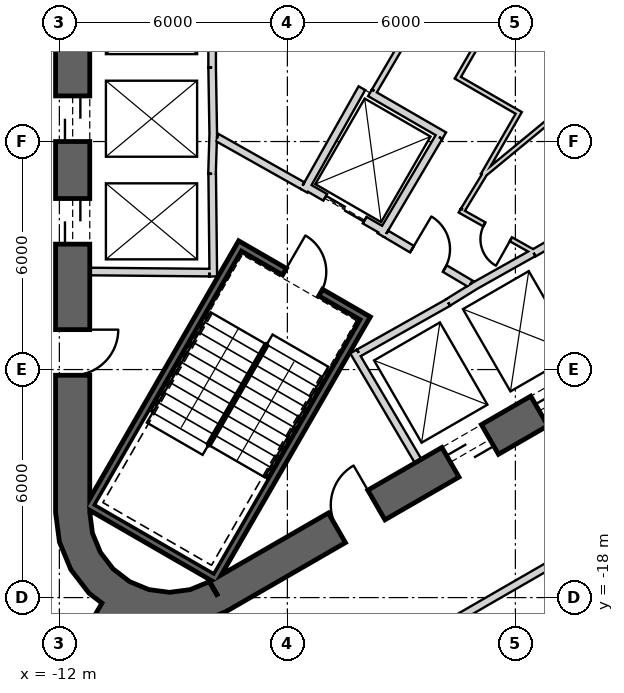
"""IFC4 building model, lengths in metres.
Left out: names, types, materials, properties, quantities, classifications, styles, units other than length and angle.
Written with IfcOpenShell. Run it as: python <this file> out.ifc"""

import sys

from ifc_helpers import new_model, si_unit, direction, frame, frame_2d, origin, place, context, subcontext, project, spatial, polyline, rectangle, outline, extrude, element, fill, save


model = new_model("IFC4")
c1 = context("Model", 3, precision=1e-05, world=origin(), true_north=direction((0.0, 1.0)))
c2 = subcontext(c1, "Body", "Model", "MODEL_VIEW")
j1 = project(units=[si_unit("LENGTHUNIT", "METRE"), si_unit("PLANEANGLEUNIT", "RADIAN")], contexts=[c1])
p1 = place(None, origin())
s1 = spatial("IfcSite", under=j1, at=p1, CompositionType="ELEMENT")
p2 = place(p1, origin())
s2 = spatial("IfcBuilding", under=s1, at=p2, CompositionType="ELEMENT")
p3 = place(p2, frame((0.0, 0.0, 229.2)))
s3 = spatial("IfcBuildingStorey", under=s2, at=p3, CompositionType="ELEMENT", Elevation=229.2)
p4 = place(p3, frame((-11.65, 15.762, 0.0), z_axis=(0.0, 0.0, 1.0), x_axis=(0.0, -1.0, 0.0)))
e1 = element("IfcWall", 1, at=p4, inside=s3, PredefinedType="SHEAR", context=c2, shape_type="SweptSolid", body=[
    extrude(rectangle(XDim=31.523, YDim=0.9, at=frame_2d((15.762, 0.0))), origin(), (0.0, 0.0, 1.0), 4.0),
])
p5 = place(p4, frame((7.062, 0.0, 0.0)))
e2 = element("IfcOpeningElement", 2, at=p5, cuts=e1, PredefinedType="OPENING", context=c2, shape_type="SweptSolid", body=[
    extrude(rectangle(XDim=1.2, YDim=2.4, at=frame_2d((0.6, 1.2))), frame((0.0, 0.46, 0.0), z_axis=(0.0, -1.0, 0.0), x_axis=(1.0, 0.0, 0.0)), (0.0, 0.0, 1.0), 0.92),
])
p6 = place(p4, frame((9.762, 0.0, 0.0)))
e3 = element("IfcOpeningElement", 3, at=p6, cuts=e1, PredefinedType="OPENING", context=c2, shape_type="SweptSolid", body=[
    extrude(rectangle(XDim=1.2, YDim=2.4, at=frame_2d((0.6, 1.2))), frame((0.0, 0.46, 0.0), z_axis=(0.0, -1.0, 0.0), x_axis=(1.0, 0.0, 0.0)), (0.0, 0.0, 1.0), 0.92),
])
p7 = place(p4, frame((12.462, 0.0, 0.0)))
e4 = element("IfcOpeningElement", 4, at=p7, cuts=e1, PredefinedType="OPENING", context=c2, shape_type="SweptSolid", body=[
    extrude(rectangle(XDim=1.2, YDim=2.4, at=frame_2d((0.6, 1.2))), frame((0.0, 0.46, 0.0), z_axis=(0.0, -1.0, 0.0), x_axis=(1.0, 0.0, 0.0)), (0.0, 0.0, 1.0), 0.92),
])
p8 = place(p4, frame((15.162, 0.0, 0.0)))
e5 = element("IfcOpeningElement", 5, at=p8, cuts=e1, PredefinedType="OPENING", context=c2, shape_type="SweptSolid", body=[
    extrude(rectangle(XDim=1.2, YDim=2.4, at=frame_2d((0.6, 1.2))), frame((0.0, 0.46, 0.0), z_axis=(0.0, -1.0, 0.0), x_axis=(1.0, 0.0, 0.0)), (0.0, 0.0, 1.0), 0.92),
])
p9 = place(p4, frame((17.862, 0.0, 0.0)))
e6 = element("IfcOpeningElement", 6, at=p9, cuts=e1, PredefinedType="OPENING", context=c2, shape_type="SweptSolid", body=[
    extrude(rectangle(XDim=1.2, YDim=2.4, at=frame_2d((0.6, 1.2))), frame((0.0, 0.46, 0.0), z_axis=(0.0, -1.0, 0.0), x_axis=(1.0, 0.0, 0.0)), (0.0, 0.0, 1.0), 0.92),
])
p10 = place(p4, frame((20.562, 0.0, 0.0)))
e7 = element("IfcOpeningElement", 7, at=p10, cuts=e1, PredefinedType="OPENING", context=c2, shape_type="SweptSolid", body=[
    extrude(rectangle(XDim=1.2, YDim=2.4, at=frame_2d((0.6, 1.2))), frame((0.0, 0.46, 0.0), z_axis=(0.0, -1.0, 0.0), x_axis=(1.0, 0.0, 0.0)), (0.0, 0.0, 1.0), 0.92),
])
p11 = place(p4, frame((23.262, 0.0, 0.0)))
e8 = element("IfcOpeningElement", 8, at=p11, cuts=e1, PredefinedType="OPENING", context=c2, shape_type="SweptSolid", body=[
    extrude(rectangle(XDim=1.2, YDim=2.4, at=frame_2d((0.6, 1.2))), frame((0.0, 0.46, 0.0), z_axis=(0.0, -1.0, 0.0), x_axis=(1.0, 0.0, 0.0)), (0.0, 0.0, 1.0), 0.92),
])
p12 = place(p4, frame((3.612, 0.0, 0.0)))
e9 = element("IfcOpeningElement", 9, at=p12, cuts=e1, PredefinedType="OPENING", context=c2, shape_type="SweptSolid", body=[
    extrude(rectangle(XDim=1.2, YDim=2.4, at=frame_2d((0.6, 1.2))), frame((0.0, 0.46, 0.0), z_axis=(0.0, -1.0, 0.0), x_axis=(1.0, 0.0, 0.0)), (0.0, 0.0, 1.0), 0.92),
])
p13 = place(p4, frame((26.712, 0.0, 0.0)))
e10 = element("IfcOpeningElement", 10, at=p13, cuts=e1, PredefinedType="OPENING", context=c2, shape_type="SweptSolid", body=[
    extrude(rectangle(XDim=1.2, YDim=2.4, at=frame_2d((0.6, 1.2))), frame((0.0, 0.46, 0.0), z_axis=(0.0, -1.0, 0.0), x_axis=(1.0, 0.0, 0.0)), (0.0, 0.0, 1.0), 0.92),
])
p14 = place(p3, frame((-7.825, -17.97, 0.0), z_axis=(0.0, 0.0, 1.0), x_axis=(0.866028369851, 0.499994862586, 0.0)))
e11 = element("IfcWall", 11, at=p14, inside=s3, PredefinedType="SHEAR", context=c2, shape_type="SweptSolid", body=[
    extrude(rectangle(XDim=31.523, YDim=0.9, at=frame_2d((15.762, 0.0))), origin(), (0.0, 0.0, 1.0), 4.0),
])
p15 = place(p14, frame((7.062, 0.0, 0.0)))
e12 = element("IfcOpeningElement", 12, at=p15, cuts=e11, PredefinedType="OPENING", context=c2, shape_type="SweptSolid", body=[
    extrude(rectangle(XDim=1.2, YDim=2.4, at=frame_2d((0.6, 1.2))), frame((0.0, 0.46, 0.0), z_axis=(0.0, -1.0, 0.0), x_axis=(1.0, 0.0, 0.0)), (0.0, 0.0, 1.0), 0.92),
])
p16 = place(p14, frame((9.762, 0.0, 0.0)))
e13 = element("IfcOpeningElement", 13, at=p16, cuts=e11, PredefinedType="OPENING", context=c2, shape_type="SweptSolid", body=[
    extrude(rectangle(XDim=1.2, YDim=2.4, at=frame_2d((0.6, 1.2))), frame((0.0, 0.46, 0.0), z_axis=(0.0, -1.0, 0.0), x_axis=(1.0, 0.0, 0.0)), (0.0, 0.0, 1.0), 0.92),
])
p17 = place(p14, frame((12.462, 0.0, 0.0)))
e14 = element("IfcOpeningElement", 14, at=p17, cuts=e11, PredefinedType="OPENING", context=c2, shape_type="SweptSolid", body=[
    extrude(rectangle(XDim=1.2, YDim=2.4, at=frame_2d((0.6, 1.2))), frame((0.0, 0.46, 0.0), z_axis=(0.0, -1.0, 0.0), x_axis=(1.0, 0.0, 0.0)), (0.0, 0.0, 1.0), 0.92),
])
p18 = place(p14, frame((15.162, 0.0, 0.0)))
e15 = element("IfcOpeningElement", 15, at=p18, cuts=e11, PredefinedType="OPENING", context=c2, shape_type="SweptSolid", body=[
    extrude(rectangle(XDim=1.2, YDim=2.4, at=frame_2d((0.6, 1.2))), frame((0.0, 0.46, 0.0), z_axis=(0.0, -1.0, 0.0), x_axis=(1.0, 0.0, 0.0)), (0.0, 0.0, 1.0), 0.92),
])
p19 = place(p14, frame((17.862, 0.0, 0.0)))
e16 = element("IfcOpeningElement", 16, at=p19, cuts=e11, PredefinedType="OPENING", context=c2, shape_type="SweptSolid", body=[
    extrude(rectangle(XDim=1.2, YDim=2.4, at=frame_2d((0.6, 1.2))), frame((0.0, 0.46, 0.0), z_axis=(0.0, -1.0, 0.0), x_axis=(1.0, 0.0, 0.0)), (0.0, 0.0, 1.0), 0.92),
])
p20 = place(p14, frame((20.562, 0.0, 0.0)))
e17 = element("IfcOpeningElement", 17, at=p20, cuts=e11, PredefinedType="OPENING", context=c2, shape_type="SweptSolid", body=[
    extrude(rectangle(XDim=1.2, YDim=2.4, at=frame_2d((0.6, 1.2))), frame((0.0, 0.46, 0.0), z_axis=(0.0, -1.0, 0.0), x_axis=(1.0, 0.0, 0.0)), (0.0, 0.0, 1.0), 0.92),
])
p21 = place(p14, frame((26.712, 0.0, 0.0)))
e18 = element("IfcOpeningElement", 18, at=p21, cuts=e11, PredefinedType="OPENING", context=c2, shape_type="SweptSolid", body=[
    extrude(rectangle(XDim=1.2, YDim=2.4, at=frame_2d((0.6, 1.2))), frame((0.0, 0.46, 0.0), z_axis=(0.0, -1.0, 0.0), x_axis=(1.0, 0.0, 0.0)), (0.0, 0.0, 1.0), 0.92),
])
p22 = place(p14, frame((3.612, 0.0, 0.0)))
e19 = element("IfcOpeningElement", 19, at=p22, cuts=e11, PredefinedType="OPENING", context=c2, shape_type="SweptSolid", body=[
    extrude(rectangle(XDim=1.2, YDim=2.4, at=frame_2d((0.6, 1.2))), frame((0.0, 0.46, 0.0), z_axis=(0.0, -1.0, 0.0), x_axis=(1.0, 0.0, 0.0)), (0.0, 0.0, 1.0), 0.92),
])
p23 = place(p3, origin())
e20 = element("IfcWall", 20, at=p23, inside=s3, PredefinedType="SHEAR", context=c2, shape_type="SweptSolid", body=[
    extrude(outline(polyline([(-12.1, -15.762), (-11.998, -16.538), (-11.698, -17.262), (-11.221, -17.883), (-10.6, -18.36), (-9.876, -18.659), (-9.1, -18.762), (-8.323, -18.659), (-7.6, -18.36), (-8.05, -17.58), (-8.556, -17.79), (-9.1, -17.862), (-9.644, -17.79), (-10.15, -17.58), (-10.585, -17.247), (-10.919, -16.812), (-11.128, -16.305), (-11.2, -15.762), (-12.1, -15.762)])), origin(), (0.0, 0.0, 1.0), 4.0),
])
p24 = place(p3, frame((-10.575, -18.316, 0.0), z_axis=(0.0, 0.0, 1.0), x_axis=(-0.499996344484, -0.866027514288, 0.0)))
e21 = element("IfcWall", 21, at=p24, inside=s3, PredefinedType="SHEAR", context=c2, shape_type="SweptSolid", body=[
    extrude(rectangle(XDim=11.368, YDim=0.7, at=frame_2d((5.684, 0.0))), origin(), (0.0, 0.0, 1.0), 4.0),
])
p25 = place(p3, frame((-7.98, 4.05, 0.0), z_axis=(0.0, 0.0, 1.0), x_axis=(0.0, -1.0, 0.0)))
e22 = element("IfcWall", 22, at=p25, inside=s3, PredefinedType="PLUMBINGWALL", context=c2, shape_type="SweptSolid", body=[
    extrude(rectangle(XDim=8.1, YDim=0.2, at=frame_2d((4.05, 0.0))), origin(), (0.0, 0.0, 1.0), 3.7),
])
p26 = place(p3, frame((-7.95, -5.772, 0.0), z_axis=(0.0, 0.0, 1.0), x_axis=(-0.030803413295, -0.999525462272, 0.0)))
e23 = element("IfcWall", 23, at=p26, inside=s3, PredefinedType="PLUMBINGWALL", context=c2, shape_type="SweptSolid", body=[
    extrude(rectangle(XDim=1.078, YDim=0.2, at=frame_2d((0.539, 0.0))), origin(), (0.0, 0.0, 1.0), 3.7),
])
p27 = place(p3, frame((-7.98, -4.05, 0.0), z_axis=(0.0, 0.0, 1.0), x_axis=(0.016809909365, -0.999858703491, 0.0)))
e24 = element("IfcWall", 24, at=p27, inside=s3, PredefinedType="PLUMBINGWALL", context=c2, shape_type="SweptSolid", body=[
    extrude(rectangle(XDim=1.844, YDim=0.2, at=frame_2d((0.922, 0.0))), origin(), (0.0, 0.0, 1.0), 3.7),
])
p28 = place(p3, frame((-7.979, -6.85, 0.0), z_axis=(0.0, 0.0, 1.0), x_axis=(0.011121475088, -0.999938154483, 0.0)))
e25 = element("IfcWall", 25, at=p28, inside=s3, PredefinedType="PLUMBINGWALL", context=c2, shape_type="SweptSolid", body=[
    extrude(rectangle(XDim=2.7, YDim=0.2, at=frame_2d((1.35, 0.0))), origin(), (0.0, 0.0, 1.0), 3.7),
])
p29 = place(p3, frame((-8.05, -9.449, 0.0), z_axis=(0.0, 0.0, 1.0), x_axis=(-0.999957467379, 0.009222983926, 0.0)))
e26 = element("IfcWall", 26, at=p29, inside=s3, PredefinedType="PLUMBINGWALL", context=c2, shape_type="SweptSolid", body=[
    extrude(rectangle(XDim=3.15, YDim=0.2, at=frame_2d((1.575, 0.0))), origin(), (0.0, 0.0, 1.0), 3.7),
])
p30 = place(p3, frame((0.483, -8.936, 0.0), z_axis=(0.0, 0.0, 1.0), x_axis=(0.866030989016, 0.499990325971, 0.0)))
e27 = element("IfcWall", 27, at=p30, inside=s3, PredefinedType="PLUMBINGWALL", context=c2, shape_type="SweptSolid", body=[
    extrude(rectangle(XDim=8.1, YDim=0.2, at=frame_2d((4.05, 0.0))), origin(), (0.0, 0.0, 1.0), 3.7),
])
p31 = place(p3, frame((-2.558, -14.409, 0.0), z_axis=(0.0, 0.0, 1.0), x_axis=(-0.507997497166, 0.861358544901, 0.0)))
e28 = element("IfcWall", 28, at=p31, inside=s3, PredefinedType="PLUMBINGWALL", context=c2, shape_type="SweptSolid", body=[
    extrude(rectangle(XDim=3.35, YDim=0.2, at=frame_2d((1.675, 0.0))), origin(), (0.0, 0.0, 1.0), 3.7),
])
p32 = place(p3, frame((-1.769, -10.237, 0.0), z_axis=(0.0, 0.0, 1.0), x_axis=(-0.871534483978, -0.490334215854, 0.0)))
e29 = element("IfcWall", 29, at=p32, inside=s3, PredefinedType="PLUMBINGWALL", context=c2, shape_type="SweptSolid", body=[
    extrude(rectangle(XDim=2.7, YDim=0.2, at=frame_2d((1.35, 0.0))), origin(), (0.0, 0.0, 1.0), 3.7),
])
p33 = place(p3, frame((-1.024, -9.771, 0.0), z_axis=(0.0, 0.0, 1.0), x_axis=(-0.850348075135, -0.526220629693, 0.0)))
e30 = element("IfcWall", 30, at=p33, inside=s3, PredefinedType="PLUMBINGWALL", context=c2, shape_type="SweptSolid", body=[
    extrude(rectangle(XDim=0.878, YDim=0.2, at=frame_2d((0.439, 0.0))), origin(), (0.0, 0.0, 1.0), 3.7),
])
p34 = place(p3, frame((-1.13, -9.832, 0.0), z_axis=(0.0, 0.0, 1.0), x_axis=(0.871988740738, 0.489525929882, 0.0)))
e31 = element("IfcWall", 31, at=p34, inside=s3, PredefinedType="PLUMBINGWALL", context=c2, shape_type="SweptSolid", body=[
    extrude(rectangle(XDim=1.845, YDim=0.2, at=frame_2d((0.922, 0.0))), origin(), (0.0, 0.0, 1.0), 3.7),
])
p35 = place(p3, frame((-3.905, -10.563, -0.3), z_axis=(0.0, 0.0, 1.0), x_axis=(-0.500012932018, -0.866017937352, 0.0)))
e32 = element("IfcWall", 32, at=p35, inside=s3, PredefinedType="SHEAR", context=c2, shape_type="SweptSolid", body=[
    extrude(rectangle(XDim=8.1, YDim=0.2, at=frame_2d((4.05, 0.0))), origin(), (0.0, 0.0, 1.0), 4.0),
])
p36 = place(p3, frame((-11.282, -15.541, -0.3), z_axis=(0.0, 0.0, 1.0), x_axis=(0.866000483506, -0.500043160704, 0.0)))
e33 = element("IfcWall", 33, at=p36, inside=s3, PredefinedType="SHEAR", context=c2, shape_type="SweptSolid", body=[
    extrude(rectangle(XDim=3.8, YDim=0.2, at=frame_2d((1.9, 0.0))), origin(), (0.0, 0.0, 1.0), 4.0),
])
p37 = place(p3, frame((-7.196, -8.663, -0.3), z_axis=(0.0, 0.0, 1.0), x_axis=(-0.499997992926, -0.866026562566, 0.0)))
e34 = element("IfcWall", 34, at=p37, inside=s3, PredefinedType="SHEAR", context=c2, shape_type="SweptSolid", body=[
    extrude(rectangle(XDim=7.9, YDim=0.2, at=frame_2d((3.95, 0.0))), origin(), (0.0, 0.0, 1.0), 4.0),
])
p38 = place(p3, frame((-4.041, -10.599, -0.3), z_axis=(0.0, 0.0, 1.0), x_axis=(-0.866047807691, 0.499961193289, 0.0)))
e35 = element("IfcWall", 35, at=p38, inside=s3, PredefinedType="SHEAR", context=c2, shape_type="SweptSolid", body=[
    extrude(rectangle(XDim=3.6, YDim=0.2, at=frame_2d((1.8, 0.0))), origin(), (0.0, 0.0, 1.0), 4.0),
])
p39 = place(p38, frame((1.25, 0.0, 0.3)))
e36 = element("IfcOpeningElement", 36, at=p39, cuts=e35, PredefinedType="OPENING", context=c2, shape_type="SweptSolid", body=[
    extrude(rectangle(XDim=1.1, YDim=2.1, at=frame_2d((0.55, 1.05))), frame((0.0, 0.11, 0.0), z_axis=(0.0, -1.0, 0.0), x_axis=(1.0, 0.0, 0.0)), (0.0, 0.0, 1.0), 0.22),
])
p40 = place(p3, frame((-3.446, -8.368, 0.0), z_axis=(0.0, 0.0, 1.0), x_axis=(-0.866024647952, 0.500001309137, 0.0)))
e37 = element("IfcWall", 37, at=p40, inside=s3, PredefinedType="PLUMBINGWALL", context=c2, shape_type="SweptSolid", body=[
    extrude(rectangle(XDim=2.4, YDim=0.2, at=frame_2d((1.2, 0.0))), origin(), (0.0, 0.0, 1.0), 3.7),
])
p41 = place(p40, frame((0.6, 0.0, 0.0)))
e38 = element("IfcOpeningElement", 38, at=p41, cuts=e37, PredefinedType="OPENING", context=c2, shape_type="SweptSolid", body=[
    extrude(rectangle(XDim=1.2, YDim=2.4, at=frame_2d((0.6, 1.2))), frame((0.0, 0.11, 0.0), z_axis=(0.0, -1.0, 0.0), x_axis=(1.0, 0.0, 0.0)), (0.0, 0.0, 1.0), 0.22),
])
p42 = place(p3, frame((-5.562, -7.296, 0.0), z_axis=(0.0, 0.0, 1.0), x_axis=(0.491322718731, 0.870977603649, 0.0)))
e39 = element("IfcWall", 39, at=p42, inside=s3, PredefinedType="PLUMBINGWALL", context=c2, shape_type="SweptSolid", body=[
    extrude(rectangle(XDim=3.1, YDim=0.2, at=frame_2d((1.55, 0.0))), origin(), (0.0, 0.0, 1.0), 3.7),
])
p43 = place(p3, frame((-3.827, -4.719, 0.0), z_axis=(0.0, 0.0, 1.0), x_axis=(0.866028691075, -0.499994306202, 0.0)))
e40 = element("IfcWall", 40, at=p43, inside=s3, PredefinedType="PLUMBINGWALL", context=c2, shape_type="SweptSolid", body=[
    extrude(rectangle(XDim=2.254, YDim=0.2, at=frame_2d((1.127, 0.0))), origin(), (0.0, 0.0, 1.0), 3.7),
])
p44 = place(p3, frame((-2.012, -5.882, 0.0), z_axis=(0.0, 0.0, 1.0), x_axis=(-0.508619639323, -0.860991325447, 0.0)))
e41 = element("IfcWall", 41, at=p44, inside=s3, PredefinedType="PLUMBINGWALL", context=c2, shape_type="SweptSolid", body=[
    extrude(rectangle(XDim=3.0, YDim=0.2, at=frame_2d((1.5, 0.0))), origin(), (0.0, 0.0, 1.0), 3.7),
])
p45 = place(p3, frame((-7.849, -5.894, 0.0), z_axis=(0.0, 0.0, 1.0), x_axis=(0.871340486379, -0.490678873396, 0.0)))
e42 = element("IfcWall", 42, at=p45, inside=s3, PredefinedType="PARTITIONING", context=c2, shape_type="SweptSolid", body=[
    extrude(rectangle(XDim=2.581, YDim=0.2, at=frame_2d((1.291, 0.0))), origin(), (0.0, 0.0, 1.0), 3.7),
])
p46 = place(p3, frame((-3.401, -8.43, 0.0), z_axis=(0.0, 0.0, 1.0), x_axis=(0.860598681535, -0.509283721849, 0.0)))
e43 = element("IfcWall", 43, at=p46, inside=s3, PredefinedType="PARTITIONING", context=c2, shape_type="SweptSolid", body=[
    extrude(rectangle(XDim=2.581, YDim=0.2, at=frame_2d((1.291, 0.0))), origin(), (0.0, 0.0, 1.0), 3.7),
])
p47 = place(p46, frame((0.791, 0.0, 0.0)))
e44 = element("IfcOpeningElement", 44, at=p47, cuts=e43, PredefinedType="OPENING", context=c2, shape_type="SweptSolid", body=[
    extrude(rectangle(XDim=1.0, YDim=2.1, at=frame_2d((0.5, 1.05))), frame((0.0, 0.11, 0.0), z_axis=(0.0, -1.0, 0.0), x_axis=(1.0, 0.0, 0.0)), (0.0, 0.0, 1.0), 0.22),
])
p48 = place(p3, frame((-3.711, -4.67, 0.0), z_axis=(0.0, 0.0, 1.0), x_axis=(0.505648368764, 0.86273966361, 0.0)))
e45 = element("IfcWall", 45, at=p48, inside=s3, PredefinedType="PLUMBINGWALL", context=c2, shape_type="SweptSolid", body=[
    extrude(rectangle(XDim=4.404, YDim=0.15, at=frame_2d((2.202, 0.0))), origin(), (0.0, 0.0, 1.0), 3.7),
])
p49 = place(p3, frame((6.046, -1.2, 0.0), z_axis=(0.0, 0.0, 1.0), x_axis=(-0.771489624803, -0.636241902755, 0.0)))
e46 = element("IfcWall", 46, at=p49, inside=s3, PredefinedType="PARTITIONING", context=c2, shape_type="SweptSolid", body=[
    extrude(rectangle(XDim=8.961, YDim=0.12, at=frame_2d((4.48, 0.0))), origin(), (0.0, 0.0, 1.0), 3.7),
])
p50 = place(p3, frame((-1.464, -7.816, 0.0), z_axis=(0.0, 0.0, 1.0), x_axis=(0.871880202732, -0.489719217597, 0.0)))
e47 = element("IfcWall", 47, at=p50, inside=s3, PredefinedType="PARTITIONING", context=c2, shape_type="SweptSolid", body=[
    extrude(rectangle(XDim=2.224, YDim=0.12, at=frame_2d((1.112, 0.0))), origin(), (0.0, 0.0, 1.0), 3.7),
])
p51 = place(p50, frame((0.742, 0.0, 0.0)))
e48 = element("IfcOpeningElement", 48, at=p51, cuts=e47, PredefinedType="OPENING", context=c2, shape_type="SweptSolid", body=[
    extrude(rectangle(XDim=0.8, YDim=2.1, at=frame_2d((0.4, 1.05))), frame((0.0, 0.07, 0.0), z_axis=(0.0, -1.0, 0.0), x_axis=(1.0, 0.0, 0.0)), (0.0, 0.0, 1.0), 0.14),
])
p52 = place(p3, frame((-0.787, -6.821, 0.0), z_axis=(0.0, 0.0, 1.0), x_axis=(-0.521033983049, -0.853535932758, 0.0)))
e49 = element("IfcWall", 49, at=p52, inside=s3, PredefinedType="PARTITIONING", context=c2, shape_type="SweptSolid", body=[
    extrude(rectangle(XDim=1.14, YDim=0.12, at=frame_2d((0.57, 0.0))), origin(), (0.0, 0.0, 1.0), 3.7),
])
p53 = place(p3, frame((0.118, -5.195, 0.0), z_axis=(0.0, 0.0, 1.0), x_axis=(-0.499969367985, -0.866043088465, 0.0)))
e50 = element("IfcWall", 50, at=p53, inside=s3, PredefinedType="PARTITIONING", context=c2, shape_type="SweptSolid", body=[
    extrude(rectangle(XDim=1.94, YDim=0.12, at=frame_2d((0.97, 0.0))), origin(), (0.0, 0.0, 1.0), 3.7),
])
p54 = place(p3, frame((-1.566, -4.292, 0.0), z_axis=(0.0, 0.0, 1.0), x_axis=(0.866091100096, -0.499886193382, 0.0)))
e51 = element("IfcWall", 51, at=p54, inside=s3, PredefinedType="PARTITIONING", context=c2, shape_type="SweptSolid", body=[
    extrude(rectangle(XDim=1.85, YDim=0.12, at=frame_2d((0.925, 0.0))), origin(), (0.0, 0.0, 1.0), 3.7),
])
p55 = place(p3, frame((0.052, -1.61, 0.0), z_axis=(0.0, 0.0, 1.0), x_axis=(-0.500011413361, -0.866018814177, 0.0)))
e52 = element("IfcWall", 52, at=p55, inside=s3, PredefinedType="PARTITIONING", context=c2, shape_type="SweptSolid", body=[
    extrude(rectangle(XDim=3.072, YDim=0.12, at=frame_2d((1.536, 0.0))), origin(), (0.0, 0.0, 1.0), 3.7),
])
p56 = place(p3, frame((-6.644, -21.503, 0.0), z_axis=(0.0, 0.0, 1.0), x_axis=(0.866020815794, 0.500007946548, 0.0)))
e53 = element("IfcWall", 53, at=p56, inside=s3, PredefinedType="PARTITIONING", context=c2, shape_type="SweptSolid", body=[
    extrude(rectangle(XDim=18.555, YDim=0.2, at=frame_2d((9.278, 0.0))), origin(), (0.0, 0.0, 1.0), 2.88),
])
p57 = place(p56, frame((2.477, 0.0, 0.0)))
e54 = element("IfcOpeningElement", 54, at=p57, cuts=e53, PredefinedType="OPENING", context=c2, shape_type="SweptSolid", body=[
    extrude(rectangle(XDim=1.0, YDim=2.1, at=frame_2d((0.5, 1.05))), frame((0.0, 0.11, 0.0), z_axis=(0.0, -1.0, 0.0), x_axis=(1.0, 0.0, 0.0)), (0.0, 0.0, 1.0), 0.22),
])
p58 = place(p39, origin())
e55 = element("IfcDoor", 55, at=p58, inside=s3, OperationType="SINGLE_SWING_RIGHT", PredefinedType="USERDEFINED", context=c2, shape_type="SweptSolid", body=[
    extrude(rectangle(XDim=1.1, YDim=2.1, at=frame_2d((0.55, 1.05))), frame((0.0, 0.025, 0.0), z_axis=(0.0, -1.0, 0.0), x_axis=(1.0, 0.0, 0.0)), (0.0, 0.0, 1.0), 0.05),
])
fill(e36, e55)
p59 = place(p47, origin())
e56 = element("IfcDoor", 56, at=p59, inside=s3, OperationType="SINGLE_SWING_LEFT", PredefinedType="USERDEFINED", context=c2, shape_type="SweptSolid", body=[
    extrude(rectangle(XDim=1.0, YDim=2.1, at=frame_2d((0.5, 1.05))), frame((0.0, 0.025, 0.0), z_axis=(0.0, -1.0, 0.0), x_axis=(1.0, 0.0, 0.0)), (0.0, 0.0, 1.0), 0.05),
])
fill(e44, e56)
p60 = place(p41, origin())
e57 = element("IfcDoor", 57, at=p60, inside=s3, OperationType="SLIDING_TO_LEFT", PredefinedType="USERDEFINED", context=c2, shape_type="SweptSolid", body=[
    extrude(rectangle(XDim=1.2, YDim=2.4, at=frame_2d((0.6, 1.2))), frame((0.0, 0.025, 0.0), z_axis=(0.0, -1.0, 0.0), x_axis=(1.0, 0.0, 0.0)), (0.0, 0.0, 1.0), 0.05),
])
fill(e38, e57)
p61 = place(p51, origin())
e58 = element("IfcDoor", 58, at=p61, inside=s3, OperationType="SINGLE_SWING_LEFT", PredefinedType="USERDEFINED", context=c2, shape_type="SweptSolid", body=[
    extrude(rectangle(XDim=0.8, YDim=2.1, at=frame_2d((0.4, 1.05))), frame((0.0, 0.025, 0.0), z_axis=(0.0, -1.0, 0.0), x_axis=(1.0, 0.0, 0.0)), (0.0, 0.0, 1.0), 0.05),
])
fill(e48, e58)
p62 = place(p10, origin())
e59 = element("IfcDoor", 59, at=p62, inside=s3, OperationType="SLIDING_TO_LEFT", PredefinedType="USERDEFINED", context=c2, shape_type="SweptSolid", body=[
    extrude(rectangle(XDim=1.2, YDim=2.4, at=frame_2d((0.6, 1.2))), frame((0.0, 0.025, 0.0), z_axis=(0.0, -1.0, 0.0), x_axis=(1.0, 0.0, 0.0)), (0.0, 0.0, 1.0), 0.05),
])
fill(e7, e59)
p63 = place(p11, origin())
e60 = element("IfcDoor", 60, at=p63, inside=s3, OperationType="SLIDING_TO_LEFT", PredefinedType="USERDEFINED", context=c2, shape_type="SweptSolid", body=[
    extrude(rectangle(XDim=1.2, YDim=2.4, at=frame_2d((0.6, 1.2))), frame((0.0, 0.025, 0.0), z_axis=(0.0, -1.0, 0.0), x_axis=(1.0, 0.0, 0.0)), (0.0, 0.0, 1.0), 0.05),
])
fill(e8, e60)
p64 = place(p15, origin())
e61 = element("IfcDoor", 61, at=p64, inside=s3, OperationType="SLIDING_TO_LEFT", PredefinedType="USERDEFINED", context=c2, shape_type="SweptSolid", body=[
    extrude(rectangle(XDim=1.2, YDim=2.4, at=frame_2d((0.6, 1.2))), frame((0.0, 0.025, 0.0), z_axis=(0.0, -1.0, 0.0), x_axis=(1.0, 0.0, 0.0)), (0.0, 0.0, 1.0), 0.05),
])
fill(e12, e61)
p65 = place(p16, origin())
e62 = element("IfcDoor", 62, at=p65, inside=s3, OperationType="SLIDING_TO_LEFT", PredefinedType="USERDEFINED", context=c2, shape_type="SweptSolid", body=[
    extrude(rectangle(XDim=1.2, YDim=2.4, at=frame_2d((0.6, 1.2))), frame((0.0, 0.025, 0.0), z_axis=(0.0, -1.0, 0.0), x_axis=(1.0, 0.0, 0.0)), (0.0, 0.0, 1.0), 0.05),
])
fill(e13, e62)
p66 = place(p13, origin())
e63 = element("IfcDoor", 63, at=p66, inside=s3, OperationType="SINGLE_SWING_RIGHT", PredefinedType="USERDEFINED", context=c2, shape_type="SweptSolid", body=[
    extrude(rectangle(XDim=1.2, YDim=2.4, at=frame_2d((0.6, 1.2))), frame((0.0, 0.025, 0.0), z_axis=(0.0, -1.0, 0.0), x_axis=(1.0, 0.0, 0.0)), (0.0, 0.0, 1.0), 0.05),
])
fill(e10, e63)
p67 = place(p22, origin())
e64 = element("IfcDoor", 64, at=p67, inside=s3, OperationType="SINGLE_SWING_RIGHT", PredefinedType="USERDEFINED", context=c2, shape_type="SweptSolid", body=[
    extrude(rectangle(XDim=1.2, YDim=2.4, at=frame_2d((0.6, 1.2))), frame((0.0, 0.025, 0.0), z_axis=(0.0, -1.0, 0.0), x_axis=(1.0, 0.0, 0.0)), (0.0, 0.0, 1.0), 0.05),
])
fill(e19, e64)
save(model, sys.argv[1])
